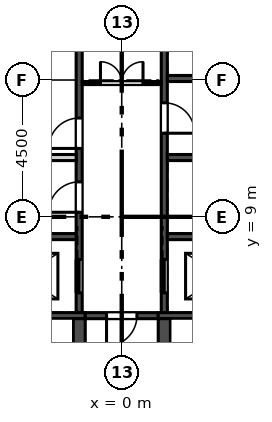
"""IFC4 building model, lengths in metres.
Left out: names, types, materials, properties, quantities, classifications, styles, units other than length and angle.
Written with IfcOpenShell. Run it as: python <this file> out.ifc"""

import sys

from ifc_helpers import new_model, si_unit, direction, frame, frame_2d, origin, place, context, subcontext, project, spatial, rectangle, extrude, element, fill, save


model = new_model("IFC4")
c1 = context("Model", 3, precision=1e-05, world=origin(), true_north=direction((0.0, 1.0)))
c2 = subcontext(c1, "Body", "Model", "MODEL_VIEW")
j1 = project(units=[si_unit("LENGTHUNIT", "METRE"), si_unit("PLANEANGLEUNIT", "RADIAN")], contexts=[c1])
p1 = place(None, origin())
s1 = spatial("IfcSite", under=j1, at=p1, CompositionType="ELEMENT")
p2 = place(p1, origin())
s2 = spatial("IfcBuilding", under=s1, at=p2, CompositionType="ELEMENT")
p3 = place(p2, frame((0.0, 0.0, 218.1)))
s3 = spatial("IfcBuildingStorey", under=s2, at=p3, CompositionType="ELEMENT", Elevation=218.1)
p4 = place(p3, frame((-1.4, 5.85, -0.4), z_axis=(0.0, 0.0, 1.0), x_axis=(0.0, 1.0, 0.0)))
e1 = element("IfcWall", 1, at=p4, inside=s3, PredefinedType="SOLIDWALL", context=c2, shape_type="SweptSolid", body=[
    extrude(rectangle(XDim=11.75, YDim=0.2, at=frame_2d((5.875, 0.0))), origin(), (0.0, 0.0, 1.0), 5.4),
])
p5 = place(p4, frame((0.65, 0.0, 0.4)))
e2 = element("IfcOpeningElement", 2, at=p5, cuts=e1, PredefinedType="OPENING", context=c2, shape_type="SweptSolid", body=[
    extrude(rectangle(XDim=1.1, YDim=2.1, at=frame_2d((0.55, 1.05))), frame((0.0, 0.11, 0.0), z_axis=(0.0, -1.0, 0.0), x_axis=(1.0, 0.0, 0.0)), (0.0, 0.0, 1.0), 0.22),
])
p6 = place(p4, frame((3.3, 0.0, 0.4)))
e3 = element("IfcOpeningElement", 3, at=p6, cuts=e1, PredefinedType="OPENING", context=c2, shape_type="SweptSolid", body=[
    extrude(rectangle(XDim=1.0, YDim=2.1, at=frame_2d((0.5, 1.05))), frame((0.0, 0.11, 0.0), z_axis=(0.0, -1.0, 0.0), x_axis=(1.0, 0.0, 0.0)), (0.0, 0.0, 1.0), 0.22),
])
p7 = place(p4, frame((5.4, 0.0, 0.4)))
e4 = element("IfcOpeningElement", 4, at=p7, cuts=e1, PredefinedType="OPENING", context=c2, shape_type="SweptSolid", body=[
    extrude(rectangle(XDim=1.0, YDim=2.1, at=frame_2d((0.5, 1.05))), frame((0.0, 0.11, 0.0), z_axis=(0.0, -1.0, 0.0), x_axis=(1.0, 0.0, 0.0)), (0.0, 0.0, 1.0), 0.22),
])
p8 = place(p3, frame((1.4, 5.85, -0.4), z_axis=(0.0, 0.0, 1.0), x_axis=(0.0, 1.0, 0.0)))
e5 = element("IfcWall", 5, at=p8, inside=s3, PredefinedType="SOLIDWALL", context=c2, shape_type="SweptSolid", body=[
    extrude(rectangle(XDim=11.75, YDim=0.2, at=frame_2d((5.875, 0.0))), origin(), (0.0, 0.0, 1.0), 5.4),
])
p9 = place(p8, frame((0.65, 0.0, 0.4)))
e6 = element("IfcOpeningElement", 6, at=p9, cuts=e5, PredefinedType="OPENING", context=c2, shape_type="SweptSolid", body=[
    extrude(rectangle(XDim=1.1, YDim=2.1, at=frame_2d((0.55, 1.05))), frame((0.0, 0.11, 0.0), z_axis=(0.0, -1.0, 0.0), x_axis=(1.0, 0.0, 0.0)), (0.0, 0.0, 1.0), 0.22),
])
p10 = place(p8, frame((5.9, 0.0, 0.4)))
e7 = element("IfcOpeningElement", 7, at=p10, cuts=e5, PredefinedType="OPENING", context=c2, shape_type="SweptSolid", body=[
    extrude(rectangle(XDim=1.0, YDim=2.1, at=frame_2d((0.5, 1.05))), frame((0.0, 0.11, 0.0), z_axis=(0.0, -1.0, 0.0), x_axis=(1.0, 0.0, 0.0)), (0.0, 0.0, 1.0), 0.22),
])
for number, where, z_axis, x_axis in (
    (8, (-5.7, 8.35, -0.4), (0.0, 0.0, 1.0), (1.0, 0.0, 0.0)),
    (9, (1.5, 8.35, -0.4), (0.0, 0.0, 1.0), (1.0, 0.0, 0.0)),
):
    element("IfcWall", number, at=place(p3, frame(where, z_axis=z_axis, x_axis=x_axis)), inside=s3, PredefinedType="SOLIDWALL", context=c2, shape_type="SweptSolid", body=[
        extrude(rectangle(XDim=4.2, YDim=0.2, at=frame_2d((2.1, 0.0))), origin(), (0.0, 0.0, 1.0), 5.4),
    ])
p11 = place(p3, frame((-12.6, 5.75, -0.4), z_axis=(0.0, 0.0, 1.0), x_axis=(1.0, 0.0, 0.0)))
e10 = element("IfcWall", 10, at=p11, inside=s3, PredefinedType="SOLIDWALL", context=c2, shape_type="SweptSolid", body=[
    extrude(rectangle(XDim=11.4, YDim=0.2, at=frame_2d((5.7, 0.0))), origin(), (0.0, 0.0, 1.0), 5.4),
])
p12 = place(p3, frame((-1.2, 5.75, -0.4), z_axis=(0.0, 0.0, 1.0), x_axis=(1.0, 0.0, 0.0)))
e11 = element("IfcWall", 11, at=p12, inside=s3, PredefinedType="SOLIDWALL", context=c2, shape_type="SweptSolid", body=[
    extrude(rectangle(XDim=2.4, YDim=0.2, at=frame_2d((1.2, 0.0))), origin(), (0.0, 0.0, 1.0), 5.4),
])
p13 = place(p12, frame((0.7, 0.0, 0.4)))
e12 = element("IfcOpeningElement", 12, at=p13, cuts=e11, PredefinedType="OPENING", context=c2, shape_type="SweptSolid", body=[
    extrude(rectangle(XDim=1.0, YDim=2.1, at=frame_2d((0.5, 1.05))), frame((0.0, 0.11, 0.0), z_axis=(0.0, -1.0, 0.0), x_axis=(1.0, 0.0, 0.0)), (0.0, 0.0, 1.0), 0.22),
])
p14 = place(p3, frame((1.2, 5.75, -0.4), z_axis=(0.0, 0.0, 1.0), x_axis=(1.0, 0.0, 0.0)))
e13 = element("IfcWall", 13, at=p14, inside=s3, PredefinedType="SOLIDWALL", context=c2, shape_type="SweptSolid", body=[
    extrude(rectangle(XDim=11.4, YDim=0.2, at=frame_2d((5.7, 0.0))), origin(), (0.0, 0.0, 1.0), 5.4),
])
for number, where, z_axis, x_axis in (
    (14, (-1.4, 2.25, -0.4), (0.0, 0.0, 1.0), (0.0, 1.0, 0.0)),
    (15, (1.4, 2.25, -0.4), (0.0, 0.0, 1.0), (0.0, 1.0, 0.0)),
):
    element("IfcWall", number, at=place(p3, frame(where, z_axis=z_axis, x_axis=x_axis)), inside=s3, PredefinedType="SOLIDWALL", context=c2, shape_type="SweptSolid", body=[
        extrude(rectangle(XDim=3.4, YDim=0.4, at=frame_2d((1.7, 0.0))), origin(), (0.0, 0.0, 1.0), 5.4),
    ])
p15 = place(p3, frame((-3.5, 10.95, 0.0), z_axis=(0.0, 0.0, 1.0), x_axis=(1.0, 0.0, 0.0)))
e16 = element("IfcWall", 16, at=p15, inside=s3, PredefinedType="SOLIDWALL", context=c2, shape_type="SweptSolid", body=[
    extrude(rectangle(XDim=2.0, YDim=0.2, at=frame_2d((1.0, 0.0))), origin(), (0.0, 0.0, 1.0), 5.0),
])
for number, where, z_axis, x_axis in (
    (17, (1.5, 10.95, -0.4), (0.0, 0.0, 1.0), (1.0, 0.0, 0.0)),
    (18, (1.5, 13.55, -0.4), (0.0, 0.0, 1.0), (1.0, 0.0, 0.0)),
):
    element("IfcWall", number, at=place(p3, frame(where, z_axis=z_axis, x_axis=x_axis)), inside=s3, PredefinedType="SOLIDWALL", context=c2, shape_type="SweptSolid", body=[
        extrude(rectangle(XDim=2.0, YDim=0.2, at=frame_2d((1.0, 0.0))), origin(), (0.0, 0.0, 1.0), 5.4),
    ])
p16 = place(p3, frame((-1.3, 13.4, 0.0), z_axis=(0.0, 0.0, 1.0), x_axis=(1.0, 0.0, 0.0)))
e19 = element("IfcWall", 19, at=p16, inside=s3, PredefinedType="PARTITIONING", context=c2, shape_type="SweptSolid", body=[
    extrude(rectangle(XDim=2.6, YDim=0.1, at=frame_2d((1.3, 0.0))), origin(), (0.0, 0.0, 1.0), 5.0),
])
p17 = place(p16, frame((0.6, 0.0, 0.0)))
e20 = element("IfcOpeningElement", 20, at=p17, cuts=e19, PredefinedType="OPENING", context=c2, shape_type="SweptSolid", body=[
    extrude(rectangle(XDim=1.4, YDim=2.1, at=frame_2d((0.7, 1.05))), frame((0.0, 0.06, 0.0), z_axis=(0.0, -1.0, 0.0), x_axis=(1.0, 0.0, 0.0)), (0.0, 0.0, 1.0), 0.12),
])
p18 = place(p5, origin())
e21 = element("IfcDoor", 21, at=p18, inside=s3, OperationType="SLIDING_TO_RIGHT", PredefinedType="DOOR", context=c2, shape_type="SweptSolid", body=[
    extrude(rectangle(XDim=1.1, YDim=2.1, at=frame_2d((0.55, 1.05))), frame((0.0, 0.025, 0.0), z_axis=(0.0, -1.0, 0.0), x_axis=(1.0, 0.0, 0.0)), (0.0, 0.0, 1.0), 0.05),
])
fill(e2, e21)
p19 = place(p9, origin())
e22 = element("IfcDoor", 22, at=p19, inside=s3, OperationType="SLIDING_TO_RIGHT", PredefinedType="DOOR", context=c2, shape_type="SweptSolid", body=[
    extrude(rectangle(XDim=1.1, YDim=2.1, at=frame_2d((0.55, 1.05))), frame((0.0, 0.025, 0.0), z_axis=(0.0, -1.0, 0.0), x_axis=(1.0, 0.0, 0.0)), (0.0, 0.0, 1.0), 0.05),
])
fill(e6, e22)
p20 = place(p6, origin())
e23 = element("IfcDoor", 23, at=p20, inside=s3, OperationType="SINGLE_SWING_LEFT", PredefinedType="DOOR", context=c2, shape_type="SweptSolid", body=[
    extrude(rectangle(XDim=1.0, YDim=2.1, at=frame_2d((0.5, 1.05))), frame((0.0, 0.025, 0.0), z_axis=(0.0, -1.0, 0.0), x_axis=(1.0, 0.0, 0.0)), (0.0, 0.0, 1.0), 0.05),
])
fill(e3, e23)
p21 = place(p7, origin())
e24 = element("IfcDoor", 24, at=p21, inside=s3, OperationType="SINGLE_SWING_LEFT", PredefinedType="DOOR", context=c2, shape_type="SweptSolid", body=[
    extrude(rectangle(XDim=1.0, YDim=2.1, at=frame_2d((0.5, 1.05))), frame((0.0, 0.025, 0.0), z_axis=(0.0, -1.0, 0.0), x_axis=(1.0, 0.0, 0.0)), (0.0, 0.0, 1.0), 0.05),
])
fill(e4, e24)
p22 = place(p10, frame((1.0, 0.0, 0.0), z_axis=(0.0, 0.0, 1.0), x_axis=(-1.0, 0.0, 0.0)))
e25 = element("IfcDoor", 25, at=p22, inside=s3, OperationType="SINGLE_SWING_RIGHT", PredefinedType="DOOR", context=c2, shape_type="SweptSolid", body=[
    extrude(rectangle(XDim=1.0, YDim=2.1, at=frame_2d((0.5, 1.05))), frame((0.0, 0.025, 0.0), z_axis=(0.0, -1.0, 0.0), x_axis=(1.0, 0.0, 0.0)), (0.0, 0.0, 1.0), 0.05),
])
fill(e7, e25)
p23 = place(p13, frame((1.0, 0.0, 0.0), z_axis=(0.0, 0.0, 1.0), x_axis=(-1.0, 0.0, 0.0)))
e26 = element("IfcDoor", 26, at=p23, inside=s3, OperationType="SINGLE_SWING_RIGHT", PredefinedType="DOOR", context=c2, shape_type="SweptSolid", body=[
    extrude(rectangle(XDim=1.0, YDim=2.1, at=frame_2d((0.5, 1.05))), frame((0.0, 0.025, 0.0), z_axis=(0.0, -1.0, 0.0), x_axis=(1.0, 0.0, 0.0)), (0.0, 0.0, 1.0), 0.05),
])
fill(e12, e26)
p24 = place(p17, origin())
e27 = element("IfcDoor", 27, at=p24, inside=s3, OperationType="DOUBLE_DOOR_SINGLE_SWING", PredefinedType="DOOR", context=c2, shape_type="SweptSolid", body=[
    extrude(rectangle(XDim=1.4, YDim=2.1, at=frame_2d((0.7, 1.05))), frame((0.0, 0.025, 0.0), z_axis=(0.0, -1.0, 0.0), x_axis=(1.0, 0.0, 0.0)), (0.0, 0.0, 1.0), 0.05),
])
fill(e20, e27)
save(model, sys.argv[1])
